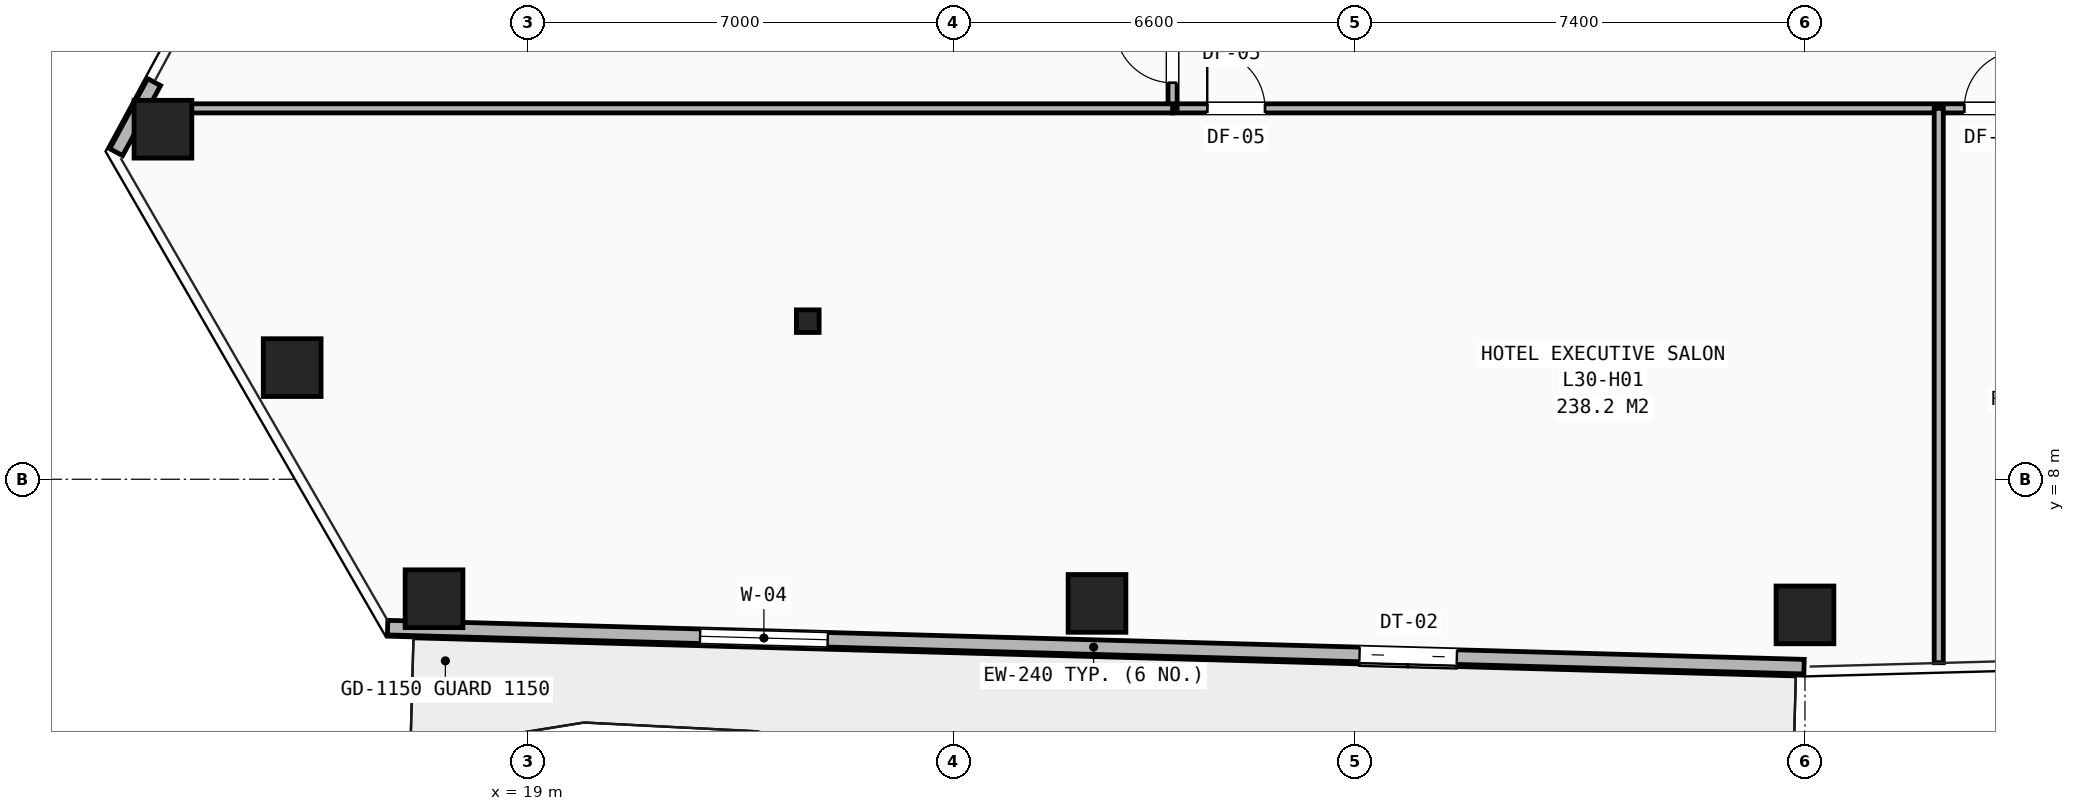
"""IFC4 building model, lengths in metres.
Left out: names, types, materials, properties, quantities, classifications, styles, units other than length and angle.
Written with IfcOpenShell. Run it as: python <this file> out.ifc"""

import sys

from ifc_helpers import new_model, si_unit, direction, frame, frame_2d, origin, origin_2d, place, context, subcontext, project, spatial, rectangle, hollow_rectangle, i_section, extrude, element, fill, save


model = new_model("IFC4")
c1 = context("Model", 3, precision=1e-05, world=origin(), true_north=direction((0.0, 1.0)))
c2 = subcontext(c1, "Body", "Model", "MODEL_VIEW")
j1 = project(units=[si_unit("LENGTHUNIT", "METRE"), si_unit("PLANEANGLEUNIT", "RADIAN")], contexts=[c1])
p1 = place(None, origin())
s1 = spatial("IfcSite", under=j1, at=p1, CompositionType="ELEMENT")
p2 = place(p1, origin())
s2 = spatial("IfcBuilding", under=s1, at=p2, CompositionType="ELEMENT")
p3 = place(p2, frame((0.0, 0.0, 105.4)))
s3 = spatial("IfcBuildingStorey", under=s2, at=p3, CompositionType="ELEMENT", Elevation=105.4)
p4 = place(p3, frame((23.6, 10.6, 0.0), z_axis=(0.0, 0.0, 1.0), x_axis=(1.0, 0.0, 0.0)))
e1 = element("IfcColumn", 1, at=p4, inside=s3, PredefinedType="COLUMN", context=c2, shape_type="SweptSolid", body=[
    extrude(i_section(OverallWidth=0.374, OverallDepth=0.372, WebThickness=0.016, FlangeThickness=0.026, at=origin_2d()), origin(), (0.0, 0.0, 1.0), 3.2),
])
for number, where, z_axis, x_axis in (
    (2, (12.996, 13.757, 0.0), (0.0, 0.0, 1.0), (1.0, 0.0, 0.0)),
    (3, (15.121, 9.836, 0.0), (0.0, 0.0, 1.0), (1.0, 0.0, 0.0)),
    (4, (17.454, 6.035, 0.0), (0.0, 0.0, 1.0), (1.0, 0.0, 0.0)),
    (5, (28.357, 5.958, 0.0), (0.0, 0.0, 1.0), (1.0, 0.0, 0.0)),
    (6, (40.0, 5.769, 0.0), (0.0, 0.0, 1.0), (1.0, 0.0, 0.0)),
):
    element("IfcColumn", number, at=place(p3, frame(where, z_axis=z_axis, x_axis=x_axis)), inside=s3, PredefinedType="COLUMN", context=c2, shape_type="SweptSolid", body=[
        extrude(hollow_rectangle(XDim=0.95, YDim=0.95, WallThickness=0.065, at=origin_2d()), origin(), (0.0, 0.0, 1.0), 3.2),
    ])
p5 = place(p3, frame((12.85, 14.532, 0.0), z_axis=(0.0, 0.0, 1.0), x_axis=(-0.475820948293, -0.879542167929, 0.0)))
e7 = element("IfcWall", 7, at=p5, inside=s3, PredefinedType="SHEAR", context=c2, shape_type="SweptSolid", body=[
    extrude(rectangle(XDim=1.311, YDim=0.24, at=frame_2d((0.655, 0.0))), origin(), (0.0, 0.0, 1.0), 2.253),
])
p6 = place(p3, frame((39.984, 4.917, 0.0), z_axis=(0.0, 0.0, 1.0), x_axis=(-0.999620599442, 0.027543731983, 0.0)))
e8 = element("IfcWall", 8, at=p6, inside=s3, PredefinedType="SHEAR", context=c2, shape_type="SweptSolid", body=[
    extrude(rectangle(XDim=23.303, YDim=0.24, at=frame_2d((11.651, 0.0))), origin(), (0.0, 0.0, 1.0), 2.253),
])
p7 = place(p6, frame((5.712, 0.0, 0.0)))
e9 = element("IfcOpeningElement", 9, at=p7, cuts=e8, PredefinedType="OPENING", context=c2, shape_type="SweptSolid", body=[
    extrude(rectangle(XDim=1.6, YDim=2.04, at=frame_2d((0.8, 1.02))), frame((0.0, 0.13, 0.0), z_axis=(0.0, -1.0, 0.0), x_axis=(1.0, 0.0, 0.0)), (0.0, 0.0, 1.0), 0.26),
])
p8 = place(p6, frame((16.062, 0.0, 0.25)))
e10 = element("IfcOpeningElement", 10, at=p8, cuts=e8, PredefinedType="OPENING", context=c2, shape_type="SweptSolid", body=[
    extrude(rectangle(XDim=2.1, YDim=1.7, at=frame_2d((1.05, 0.85))), frame((0.0, 0.13, 0.0), z_axis=(0.0, -1.0, 0.0), x_axis=(1.0, 0.0, 0.0)), (0.0, 0.0, 1.0), 0.26),
])
p9 = place(p3, frame((29.6, 14.1, 0.0), z_axis=(0.0, 0.0, 1.0), x_axis=(1.0, 0.0, 0.0)))
e11 = element("IfcWall", 11, at=p9, inside=s3, PredefinedType="PARTITIONING", context=c2, shape_type="SweptSolid", body=[
    extrude(rectangle(XDim=20.8, YDim=0.15, at=frame_2d((10.4, 0.0))), origin(), (0.0, 0.0, 1.0), 2.421),
])
p10 = place(p9, frame((0.57, 0.0, 0.0)))
e12 = element("IfcOpeningElement", 12, at=p10, cuts=e11, PredefinedType="OPENING", context=c2, shape_type="SweptSolid", body=[
    extrude(rectangle(XDim=0.95, YDim=2.1, at=frame_2d((0.475, 1.05))), frame((0.0, 0.085, 0.0), z_axis=(0.0, -1.0, 0.0), x_axis=(1.0, 0.0, 0.0)), (0.0, 0.0, 1.0), 0.17),
])
p11 = place(p9, frame((13.02, 0.0, 0.0)))
e13 = element("IfcOpeningElement", 13, at=p11, cuts=e11, PredefinedType="OPENING", context=c2, shape_type="SweptSolid", body=[
    extrude(rectangle(XDim=0.95, YDim=2.1, at=frame_2d((0.475, 1.05))), frame((0.0, 0.085, 0.0), z_axis=(0.0, -1.0, 0.0), x_axis=(1.0, 0.0, 0.0)), (0.0, 0.0, 1.0), 0.17),
])
p12 = place(p9, frame((17.42, 0.0, 0.0)))
e14 = element("IfcOpeningElement", 14, at=p12, cuts=e11, PredefinedType="OPENING", context=c2, shape_type="SweptSolid", body=[
    extrude(rectangle(XDim=0.95, YDim=2.1, at=frame_2d((0.475, 1.05))), frame((0.0, 0.085, 0.0), z_axis=(0.0, -1.0, 0.0), x_axis=(1.0, 0.0, 0.0)), (0.0, 0.0, 1.0), 0.17),
])
p13 = place(p3, frame((29.6, 14.1, 0.0), z_axis=(0.0, 0.0, 1.0), x_axis=(0.0, 1.0, 0.0)))
e15 = element("IfcWall", 15, at=p13, inside=s3, PredefinedType="PARTITIONING", context=c2, shape_type="SweptSolid", body=[
    extrude(rectangle(XDim=21.9, YDim=0.15, at=frame_2d((10.95, 0.0))), origin(), (0.0, 0.0, 1.0), 2.421),
])
p14 = place(p13, frame((0.42, 0.0, 0.0)))
e16 = element("IfcOpeningElement", 16, at=p14, cuts=e15, PredefinedType="OPENING", context=c2, shape_type="SweptSolid", body=[
    extrude(rectangle(XDim=0.95, YDim=2.1, at=frame_2d((0.475, 1.05))), frame((0.0, 0.085, 0.0), z_axis=(0.0, -1.0, 0.0), x_axis=(1.0, 0.0, 0.0)), (0.0, 0.0, 1.0), 0.17),
])
p15 = place(p13, frame((5.12, 0.0, 0.0)))
e17 = element("IfcOpeningElement", 17, at=p15, cuts=e15, PredefinedType="OPENING", context=c2, shape_type="SweptSolid", body=[
    extrude(rectangle(XDim=0.95, YDim=2.1, at=frame_2d((0.475, 1.05))), frame((0.0, 0.085, 0.0), z_axis=(0.0, -1.0, 0.0), x_axis=(1.0, 0.0, 0.0)), (0.0, 0.0, 1.0), 0.17),
])
p16 = place(p13, frame((10.32, 0.0, 0.0)))
e18 = element("IfcOpeningElement", 18, at=p16, cuts=e15, PredefinedType="OPENING", context=c2, shape_type="SweptSolid", body=[
    extrude(rectangle(XDim=0.95, YDim=2.1, at=frame_2d((0.475, 1.05))), frame((0.0, 0.085, 0.0), z_axis=(0.0, -1.0, 0.0), x_axis=(1.0, 0.0, 0.0)), (0.0, 0.0, 1.0), 0.17),
])
p17 = place(p13, frame((16.12, 0.0, 0.0)))
e19 = element("IfcOpeningElement", 19, at=p17, cuts=e15, PredefinedType="OPENING", context=c2, shape_type="SweptSolid", body=[
    extrude(rectangle(XDim=0.95, YDim=2.1, at=frame_2d((0.475, 1.05))), frame((0.0, 0.085, 0.0), z_axis=(0.0, -1.0, 0.0), x_axis=(1.0, 0.0, 0.0)), (0.0, 0.0, 1.0), 0.17),
])
p18 = place(p3, frame((42.2, 4.983, 0.0), z_axis=(0.0, 0.0, 1.0), x_axis=(0.0, 1.0, 0.0)))
e20 = element("IfcWall", 20, at=p18, inside=s3, PredefinedType="PARTITIONING", context=c2, shape_type="SweptSolid", body=[
    extrude(rectangle(XDim=9.117, YDim=0.15, at=frame_2d((4.559, 0.0))), origin(), (0.0, 0.0, 1.0), 2.258),
])
p19 = place(p3, frame((12.622, 14.1, 0.0), z_axis=(0.0, 0.0, 1.0), x_axis=(1.0, 0.0, 0.0)))
e21 = element("IfcWall", 21, at=p19, inside=s3, PredefinedType="PARTITIONING", context=c2, shape_type="SweptSolid", body=[
    extrude(rectangle(XDim=16.978, YDim=0.15, at=frame_2d((8.489, 0.0))), origin(), (0.0, 0.0, 1.0), 2.258),
])
p20 = place(p7, origin())
e22 = element("IfcDoor", 22, at=p20, inside=s3, OperationType="SINGLE_SWING_LEFT", PredefinedType="DOOR", context=c2, shape_type="SweptSolid", body=[
    extrude(rectangle(XDim=1.6, YDim=2.04, at=frame_2d((0.8, 1.02))), frame((0.0, 0.025, 0.0), z_axis=(0.0, -1.0, 0.0), x_axis=(1.0, 0.0, 0.0)), (0.0, 0.0, 1.0), 0.05),
])
fill(e9, e22)
p21 = place(p8, origin())
e23 = element("IfcWindow", 23, at=p21, inside=s3, PartitioningType="SINGLE_PANEL", PredefinedType="WINDOW", context=c2, shape_type="SweptSolid", body=[
    extrude(rectangle(XDim=2.1, YDim=1.7, at=frame_2d((1.05, 0.85))), frame((0.0, 0.03, 0.0), z_axis=(0.0, -1.0, 0.0), x_axis=(1.0, 0.0, 0.0)), (0.0, 0.0, 1.0), 0.06),
])
fill(e10, e23)
p22 = place(p10, origin())
e24 = element("IfcDoor", 24, at=p22, inside=s3, OperationType="SINGLE_SWING_LEFT", PredefinedType="DOOR", context=c2, shape_type="SweptSolid", body=[
    extrude(rectangle(XDim=0.95, YDim=2.1, at=frame_2d((0.475, 1.05))), frame((0.0, 0.025, 0.0), z_axis=(0.0, -1.0, 0.0), x_axis=(1.0, 0.0, 0.0)), (0.0, 0.0, 1.0), 0.05),
])
fill(e12, e24)
p23 = place(p11, origin())
e25 = element("IfcDoor", 25, at=p23, inside=s3, OperationType="SINGLE_SWING_RIGHT", PredefinedType="DOOR", context=c2, shape_type="SweptSolid", body=[
    extrude(rectangle(XDim=0.95, YDim=2.1, at=frame_2d((0.475, 1.05))), frame((0.0, 0.025, 0.0), z_axis=(0.0, -1.0, 0.0), x_axis=(1.0, 0.0, 0.0)), (0.0, 0.0, 1.0), 0.05),
])
fill(e13, e25)
p24 = place(p14, origin())
e26 = element("IfcDoor", 26, at=p24, inside=s3, OperationType="SINGLE_SWING_RIGHT", PredefinedType="DOOR", context=c2, shape_type="SweptSolid", body=[
    extrude(rectangle(XDim=0.95, YDim=2.1, at=frame_2d((0.475, 1.05))), frame((0.0, 0.025, 0.0), z_axis=(0.0, -1.0, 0.0), x_axis=(1.0, 0.0, 0.0)), (0.0, 0.0, 1.0), 0.05),
])
fill(e16, e26)
save(model, sys.argv[1])
